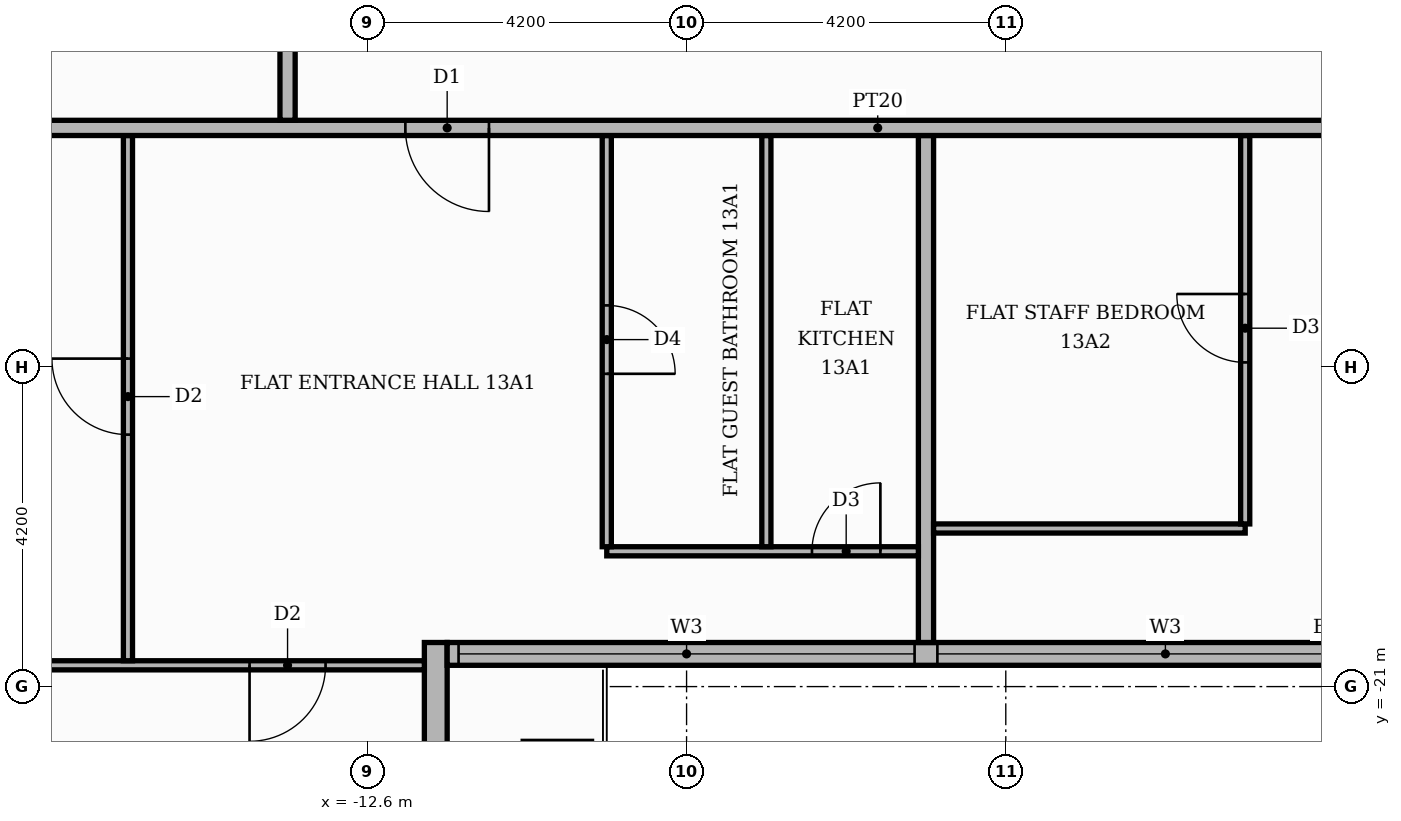
"""IFC4 building model, lengths in metres.
Left out: names, types, materials, properties, quantities, classifications, styles, units other than length and angle.
Written with IfcOpenShell. Run it as: python <this file> out.ifc"""

import sys

from ifc_helpers import new_model, si_unit, direction, frame, frame_2d, origin, place, context, subcontext, project, spatial, rectangle, extrude, element, fill, save


model = new_model("IFC4")
c1 = context("Model", 3, precision=1e-05, world=origin(), true_north=direction((0.0, 1.0)))
c2 = subcontext(c1, "Body", "Model", "MODEL_VIEW")
j1 = project(units=[si_unit("LENGTHUNIT", "METRE"), si_unit("PLANEANGLEUNIT", "RADIAN")], contexts=[c1])
p1 = place(None, origin())
s1 = spatial("IfcSite", under=j1, at=p1, CompositionType="ELEMENT")
p2 = place(p1, origin())
s2 = spatial("IfcBuilding", under=s1, at=p2, CompositionType="ELEMENT")
p3 = place(p2, frame((0.0, 0.0, 58.2)))
s3 = spatial("IfcBuildingStorey", under=s2, at=p3, CompositionType="ELEMENT", Elevation=58.2)
p4 = place(p3, frame((-11.7, -25.42, 0.0), z_axis=(0.0, 0.0, 1.0), x_axis=(0.0, 1.0, 0.0)))
e1 = element("IfcWall", 1, at=p4, inside=s3, PredefinedType="STANDARD", context=c2, shape_type="SweptSolid", body=[
    extrude(rectangle(XDim=5.0, YDim=0.3, at=frame_2d((2.5, 0.0))), origin(), (0.0, 0.0, 1.0), 3.48),
])
p5 = place(p4, frame((1.42, 0.0, 0.0)))
e2 = element("IfcOpeningElement", 2, at=p5, cuts=e1, PredefinedType="OPENING", context=c2, shape_type="SweptSolid", body=[
    extrude(rectangle(XDim=1.8, YDim=2.4, at=frame_2d((0.9, 1.2))), frame((0.0, 0.16, 0.0), z_axis=(0.0, -1.0, 0.0), x_axis=(1.0, 0.0, 0.0)), (0.0, 0.0, 1.0), 0.32),
])
p6 = place(p3, frame((-11.55, -20.57, 0.0), z_axis=(0.0, 0.0, 1.0), x_axis=(1.0, 0.0, 0.0)))
e3 = element("IfcWall", 3, at=p6, inside=s3, PredefinedType="STANDARD", context=c2, shape_type="SweptSolid", body=[
    extrude(rectangle(XDim=23.4, YDim=0.3, at=frame_2d((11.7, 0.0))), origin(), (0.0, 0.0, 1.0), 3.48),
])
p7 = place(p6, frame((0.15, 0.0, 0.9)))
e4 = element("IfcOpeningElement", 4, at=p7, cuts=e3, PredefinedType="OPENING", context=c2, shape_type="SweptSolid", body=[
    extrude(rectangle(XDim=6.0, YDim=2.1, at=frame_2d((3.0, 1.05))), frame((0.0, 0.16, 0.0), z_axis=(0.0, -1.0, 0.0), x_axis=(1.0, 0.0, 0.0)), (0.0, 0.0, 1.0), 0.32),
])
p8 = place(p6, frame((6.45, 0.0, 0.9)))
e5 = element("IfcOpeningElement", 5, at=p8, cuts=e3, PredefinedType="OPENING", context=c2, shape_type="SweptSolid", body=[
    extrude(rectangle(XDim=6.0, YDim=2.1, at=frame_2d((3.0, 1.05))), frame((0.0, 0.16, 0.0), z_axis=(0.0, -1.0, 0.0), x_axis=(1.0, 0.0, 0.0)), (0.0, 0.0, 1.0), 0.32),
])
p9 = place(p6, frame((12.75, 0.0, 0.9)))
e6 = element("IfcOpeningElement", 6, at=p9, cuts=e3, PredefinedType="OPENING", context=c2, shape_type="SweptSolid", body=[
    extrude(rectangle(XDim=6.0, YDim=2.1, at=frame_2d((3.0, 1.05))), frame((0.0, 0.16, 0.0), z_axis=(0.0, -1.0, 0.0), x_axis=(1.0, 0.0, 0.0)), (0.0, 0.0, 1.0), 0.32),
])
p10 = place(p6, frame((19.05, 0.0, 0.9)))
e7 = element("IfcOpeningElement", 7, at=p10, cuts=e3, PredefinedType="OPENING", context=c2, shape_type="SweptSolid", body=[
    extrude(rectangle(XDim=3.9, YDim=2.1, at=frame_2d((1.95, 1.05))), frame((0.0, 0.16, 0.0), z_axis=(0.0, -1.0, 0.0), x_axis=(1.0, 0.0, 0.0)), (0.0, 0.0, 1.0), 0.32),
])
p11 = place(p3, frame((-25.42, -20.72, 0.0), z_axis=(0.0, 0.0, 1.0), x_axis=(1.0, 0.0, 0.0)))
e8 = element("IfcWall", 8, at=p11, inside=s3, PredefinedType="PARTITIONING", context=c2, shape_type="SweptSolid", body=[
    extrude(rectangle(XDim=13.57, YDim=0.12, at=frame_2d((6.785, 0.0))), origin(), (0.0, 0.0, 1.0), 3.48),
])
p12 = place(p11, frame((11.27, 0.0, 0.0)))
e9 = element("IfcOpeningElement", 9, at=p12, cuts=e8, PredefinedType="OPENING", context=c2, shape_type="SweptSolid", body=[
    extrude(rectangle(XDim=1.0, YDim=2.1, at=frame_2d((0.5, 1.05))), frame((0.0, 0.07, 0.0), z_axis=(0.0, -1.0, 0.0), x_axis=(1.0, 0.0, 0.0)), (0.0, 0.0, 1.0), 0.14),
])
p13 = place(p3, frame((-5.25, -20.42, 0.0), z_axis=(0.0, 0.0, 1.0), x_axis=(0.0, 1.0, 0.0)))
e10 = element("IfcWall", 10, at=p13, inside=s3, PredefinedType="PARTITIONING", context=c2, shape_type="SweptSolid", body=[
    extrude(rectangle(XDim=6.67, YDim=0.2, at=frame_2d((3.335, 0.0))), origin(), (0.0, 0.0, 1.0), 3.48),
])
p14 = place(p3, frame((-15.75, -20.66, 0.0), z_axis=(0.0, 0.0, 1.0), x_axis=(0.0, 1.0, 0.0)))
e11 = element("IfcWall", 11, at=p14, inside=s3, PredefinedType="PARTITIONING", context=c2, shape_type="SweptSolid", body=[
    extrude(rectangle(XDim=6.91, YDim=0.12, at=frame_2d((3.455, 0.0))), origin(), (0.0, 0.0, 1.0), 3.48),
])
p15 = place(p14, frame((2.975, 0.0, 0.0)))
e12 = element("IfcOpeningElement", 12, at=p15, cuts=e11, PredefinedType="OPENING", context=c2, shape_type="SweptSolid", body=[
    extrude(rectangle(XDim=1.0, YDim=2.1, at=frame_2d((0.5, 1.05))), frame((0.0, 0.07, 0.0), z_axis=(0.0, -1.0, 0.0), x_axis=(1.0, 0.0, 0.0)), (0.0, 0.0, 1.0), 0.14),
])
p16 = place(p3, frame((-9.45, -19.22, 0.0), z_axis=(0.0, 0.0, 1.0), x_axis=(1.0, 0.0, 0.0)))
e13 = element("IfcWall", 13, at=p16, inside=s3, PredefinedType="PARTITIONING", context=c2, shape_type="SweptSolid", body=[
    extrude(rectangle(XDim=4.1, YDim=0.12, at=frame_2d((2.05, 0.0))), origin(), (0.0, 0.0, 1.0), 3.48),
])
p17 = place(p16, frame((2.7, 0.0, 0.0)))
e14 = element("IfcOpeningElement", 14, at=p17, cuts=e13, PredefinedType="OPENING", context=c2, shape_type="SweptSolid", body=[
    extrude(rectangle(XDim=0.9, YDim=2.1, at=frame_2d((0.45, 1.05))), frame((0.0, 0.07, 0.0), z_axis=(0.0, -1.0, 0.0), x_axis=(1.0, 0.0, 0.0)), (0.0, 0.0, 1.0), 0.14),
])
p18 = place(p3, frame((-9.45, -19.16, 0.0), z_axis=(0.0, 0.0, 1.0), x_axis=(0.0, 1.0, 0.0)))
e15 = element("IfcWall", 15, at=p18, inside=s3, PredefinedType="PARTITIONING", context=c2, shape_type="SweptSolid", body=[
    extrude(rectangle(XDim=5.41, YDim=0.12, at=frame_2d((2.705, 0.0))), origin(), (0.0, 0.0, 1.0), 3.48),
])
p19 = place(p18, frame((2.275, 0.0, 0.0)))
e16 = element("IfcOpeningElement", 16, at=p19, cuts=e15, PredefinedType="OPENING", context=c2, shape_type="SweptSolid", body=[
    extrude(rectangle(XDim=0.9, YDim=2.1, at=frame_2d((0.45, 1.05))), frame((0.0, 0.07, 0.0), z_axis=(0.0, -1.0, 0.0), x_axis=(1.0, 0.0, 0.0)), (0.0, 0.0, 1.0), 0.14),
])
p20 = place(p3, frame((-7.35, -19.16, 0.0), z_axis=(0.0, 0.0, 1.0), x_axis=(0.0, 1.0, 0.0)))
e17 = element("IfcWall", 17, at=p20, inside=s3, PredefinedType="PARTITIONING", context=c2, shape_type="SweptSolid", body=[
    extrude(rectangle(XDim=5.41, YDim=0.12, at=frame_2d((2.705, 0.0))), origin(), (0.0, 0.0, 1.0), 3.48),
])
p21 = place(p3, frame((-5.15, -18.92, 0.0), z_axis=(0.0, 0.0, 1.0), x_axis=(1.0, 0.0, 0.0)))
e18 = element("IfcWall", 18, at=p21, inside=s3, PredefinedType="PARTITIONING", context=c2, shape_type="SweptSolid", body=[
    extrude(rectangle(XDim=4.1, YDim=0.12, at=frame_2d((2.05, 0.0))), origin(), (0.0, 0.0, 1.0), 3.48),
])
p22 = place(p3, frame((-1.05, -18.86, 0.0), z_axis=(0.0, 0.0, 1.0), x_axis=(0.0, 1.0, 0.0)))
e19 = element("IfcWall", 19, at=p22, inside=s3, PredefinedType="PARTITIONING", context=c2, shape_type="SweptSolid", body=[
    extrude(rectangle(XDim=5.11, YDim=0.12, at=frame_2d((2.555, 0.0))), origin(), (0.0, 0.0, 1.0), 3.48),
])
p23 = place(p22, frame((2.125, 0.0, 0.0)))
e20 = element("IfcOpeningElement", 20, at=p23, cuts=e19, PredefinedType="OPENING", context=c2, shape_type="SweptSolid", body=[
    extrude(rectangle(XDim=0.9, YDim=2.1, at=frame_2d((0.45, 1.05))), frame((0.0, 0.07, 0.0), z_axis=(0.0, -1.0, 0.0), x_axis=(1.0, 0.0, 0.0)), (0.0, 0.0, 1.0), 0.14),
])
p24 = place(p3, frame((-25.42, -13.65, 0.0), z_axis=(0.0, 0.0, 1.0), x_axis=(1.0, 0.0, 0.0)))
e21 = element("IfcWall", 21, at=p24, inside=s3, PredefinedType="PARTITIONING", context=c2, shape_type="SweptSolid", body=[
    extrude(rectangle(XDim=39.07, YDim=0.2, at=frame_2d((19.535, 0.0))), origin(), (0.0, 0.0, 1.0), 3.48),
])
p25 = place(p24, frame((13.32, 0.0, 0.0)))
e22 = element("IfcOpeningElement", 22, at=p25, cuts=e21, PredefinedType="OPENING", context=c2, shape_type="SweptSolid", body=[
    extrude(rectangle(XDim=1.1, YDim=2.4, at=frame_2d((0.55, 1.2))), frame((0.0, 0.11, 0.0), z_axis=(0.0, -1.0, 0.0), x_axis=(1.0, 0.0, 0.0)), (0.0, 0.0, 1.0), 0.22),
])
p26 = place(p24, frame((25.92, 0.0, 0.0)))
e23 = element("IfcOpeningElement", 23, at=p26, cuts=e21, PredefinedType="OPENING", context=c2, shape_type="SweptSolid", body=[
    extrude(rectangle(XDim=1.1, YDim=2.4, at=frame_2d((0.55, 1.2))), frame((0.0, 0.11, 0.0), z_axis=(0.0, -1.0, 0.0), x_axis=(1.0, 0.0, 0.0)), (0.0, 0.0, 1.0), 0.22),
])
p27 = place(p3, frame((-13.65, -13.55, 0.0), z_axis=(0.0, 0.0, 1.0), x_axis=(0.0, 1.0, 0.0)))
e24 = element("IfcWall", 24, at=p27, inside=s3, PredefinedType="PARTITIONING", context=c2, shape_type="SweptSolid", body=[
    extrude(rectangle(XDim=18.7, YDim=0.2, at=frame_2d((9.35, 0.0))), origin(), (0.0, 0.0, 1.0), 3.48),
])
p28 = place(p27, frame((11.95, 0.0, 0.0)))
e25 = element("IfcOpeningElement", 25, at=p28, cuts=e24, PredefinedType="OPENING", context=c2, shape_type="SweptSolid", body=[
    extrude(rectangle(XDim=1.1, YDim=2.4, at=frame_2d((0.55, 1.2))), frame((0.0, 0.11, 0.0), z_axis=(0.0, -1.0, 0.0), x_axis=(1.0, 0.0, 0.0)), (0.0, 0.0, 1.0), 0.22),
])
p29 = place(p7, origin())
e26 = element("IfcWindow", 26, at=p29, inside=s3, PartitioningType="SINGLE_PANEL", PredefinedType="WINDOW", context=c2, shape_type="SweptSolid", body=[
    extrude(rectangle(XDim=6.0, YDim=2.1, at=frame_2d((3.0, 1.05))), frame((0.0, 0.03, 0.0), z_axis=(0.0, -1.0, 0.0), x_axis=(1.0, 0.0, 0.0)), (0.0, 0.0, 1.0), 0.06),
])
fill(e4, e26)
p30 = place(p8, origin())
e27 = element("IfcWindow", 27, at=p30, inside=s3, PartitioningType="SINGLE_PANEL", PredefinedType="WINDOW", context=c2, shape_type="SweptSolid", body=[
    extrude(rectangle(XDim=6.0, YDim=2.1, at=frame_2d((3.0, 1.05))), frame((0.0, 0.03, 0.0), z_axis=(0.0, -1.0, 0.0), x_axis=(1.0, 0.0, 0.0)), (0.0, 0.0, 1.0), 0.06),
])
fill(e5, e27)
p31 = place(p25, frame((1.1, 0.0, 0.0), z_axis=(0.0, 0.0, 1.0), x_axis=(-1.0, 0.0, 0.0)))
e28 = element("IfcDoor", 28, at=p31, inside=s3, OperationType="SINGLE_SWING_RIGHT", PredefinedType="DOOR", context=c2, shape_type="SweptSolid", body=[
    extrude(rectangle(XDim=1.1, YDim=2.4, at=frame_2d((0.55, 1.2))), frame((0.0, 0.025, 0.0), z_axis=(0.0, -1.0, 0.0), x_axis=(1.0, 0.0, 0.0)), (0.0, 0.0, 1.0), 0.05),
])
fill(e22, e28)
p32 = place(p15, origin())
e29 = element("IfcDoor", 29, at=p32, inside=s3, OperationType="SINGLE_SWING_RIGHT", PredefinedType="DOOR", context=c2, shape_type="SweptSolid", body=[
    extrude(rectangle(XDim=1.0, YDim=2.1, at=frame_2d((0.5, 1.05))), frame((0.0, 0.025, 0.0), z_axis=(0.0, -1.0, 0.0), x_axis=(1.0, 0.0, 0.0)), (0.0, 0.0, 1.0), 0.05),
])
fill(e12, e29)
p33 = place(p19, frame((0.9, 0.0, 0.0), z_axis=(0.0, 0.0, 1.0), x_axis=(-1.0, 0.0, 0.0)))
e30 = element("IfcDoor", 30, at=p33, inside=s3, OperationType="SINGLE_SWING_LEFT", PredefinedType="DOOR", context=c2, shape_type="SweptSolid", body=[
    extrude(rectangle(XDim=0.9, YDim=2.1, at=frame_2d((0.45, 1.05))), frame((0.0, 0.025, 0.0), z_axis=(0.0, -1.0, 0.0), x_axis=(1.0, 0.0, 0.0)), (0.0, 0.0, 1.0), 0.05),
])
fill(e16, e30)
p34 = place(p17, origin())
e31 = element("IfcDoor", 31, at=p34, inside=s3, OperationType="SINGLE_SWING_RIGHT", PredefinedType="DOOR", context=c2, shape_type="SweptSolid", body=[
    extrude(rectangle(XDim=0.9, YDim=2.1, at=frame_2d((0.45, 1.05))), frame((0.0, 0.025, 0.0), z_axis=(0.0, -1.0, 0.0), x_axis=(1.0, 0.0, 0.0)), (0.0, 0.0, 1.0), 0.05),
])
fill(e14, e31)
p35 = place(p12, frame((1.0, 0.0, 0.0), z_axis=(0.0, 0.0, 1.0), x_axis=(-1.0, 0.0, 0.0)))
e32 = element("IfcDoor", 32, at=p35, inside=s3, OperationType="SINGLE_SWING_LEFT", PredefinedType="DOOR", context=c2, shape_type="SweptSolid", body=[
    extrude(rectangle(XDim=1.0, YDim=2.1, at=frame_2d((0.5, 1.05))), frame((0.0, 0.025, 0.0), z_axis=(0.0, -1.0, 0.0), x_axis=(1.0, 0.0, 0.0)), (0.0, 0.0, 1.0), 0.05),
])
fill(e9, e32)
p36 = place(p23, origin())
e33 = element("IfcDoor", 33, at=p36, inside=s3, OperationType="SINGLE_SWING_RIGHT", PredefinedType="DOOR", context=c2, shape_type="SweptSolid", body=[
    extrude(rectangle(XDim=0.9, YDim=2.1, at=frame_2d((0.45, 1.05))), frame((0.0, 0.025, 0.0), z_axis=(0.0, -1.0, 0.0), x_axis=(1.0, 0.0, 0.0)), (0.0, 0.0, 1.0), 0.05),
])
fill(e20, e33)
save(model, sys.argv[1])
